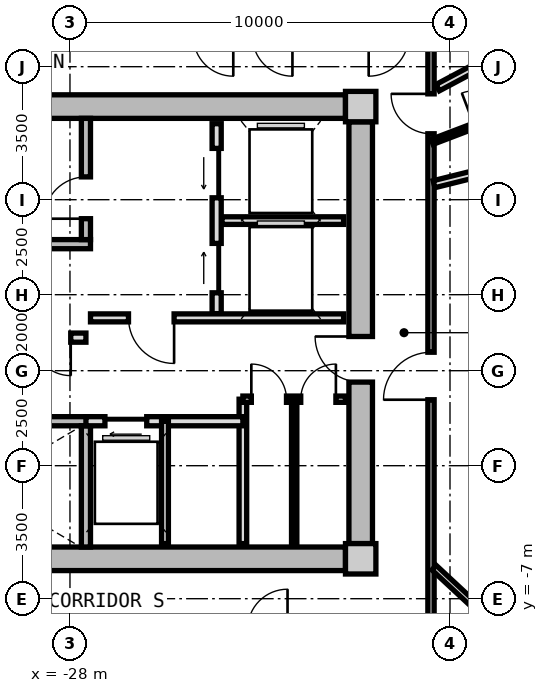
"""IFC4 building model, lengths in metres.
Left out: names, types, materials, properties, quantities, classifications, styles, units other than length and angle.
Written with IfcOpenShell. Run it as: python <this file> out.ifc"""

import sys

from ifc_helpers import new_model, si_unit, direction, frame, frame_2d, origin, origin_2d, place, context, subcontext, project, spatial, rectangle, extrude, source, transform, mapped, element, fill, save


model = new_model("IFC4")
c1 = context("Model", 3, precision=1e-05, world=origin(), true_north=direction((0.0, 1.0)))
c2 = subcontext(c1, "Body", "Model", "MODEL_VIEW")
j1 = project(units=[si_unit("LENGTHUNIT", "METRE"), si_unit("PLANEANGLEUNIT", "RADIAN")], contexts=[c1])
p1 = place(None, origin())
s1 = spatial("IfcSite", under=j1, at=p1, CompositionType="ELEMENT")
p2 = place(p1, origin())
s2 = spatial("IfcBuilding", under=s1, at=p2, CompositionType="ELEMENT")
p3 = place(p2, frame((0.0, 0.0, 146.5)))
s3 = spatial("IfcBuildingStorey", under=s2, at=p3, CompositionType="ELEMENT", Elevation=146.5)
m1 = source(origin(), c2, "Body", "SweptSolid", [
    extrude(rectangle(XDim=0.8, YDim=0.8, at=origin_2d()), origin(), (0.0, 0.0, 1.0), 3.05),
])
for number, where, z_axis, x_axis in (
    (1, (-20.35, -5.95, 0.0), (0.0, 0.0, 1.0), (1.0, 0.0, 0.0)),
    (2, (-20.35, 5.95, 0.0), (0.0, 0.0, 1.0), (1.0, 0.0, 0.0)),
):
    element("IfcColumn", number, at=place(p3, frame(where, z_axis=z_axis, x_axis=x_axis)), inside=s3, PredefinedType="COLUMN", context=c2, shape_type="MappedRepresentation", body=[
        mapped(m1, transform((0.0, 0.0, 0.0), x_axis=(1.0, 0.0, 0.0), y_axis=(0.0, 1.0, 0.0), z_axis=(0.0, 0.0, 1.0), scale=1.0)),
    ])
m2 = source(origin(), c2, "Body", "SweptSolid", [
    extrude(rectangle(XDim=14.5, YDim=0.62, at=frame_2d((7.25, 0.0))), origin(), (0.0, 0.0, 1.0), 2.81),
])
for number, where, z_axis, x_axis in (
    (3, (-35.25, 5.95, 0.0), (0.0, 0.0, 1.0), (1.0, 0.0, 0.0)),
    (4, (-20.75, -5.95, 0.0), (0.0, 0.0, 1.0), (-1.0, 0.0, 0.0)),
):
    element("IfcWall", number, at=place(p3, frame(where, z_axis=z_axis, x_axis=x_axis)), inside=s3, PredefinedType="SHEAR", context=c2, shape_type="MappedRepresentation", body=[
        mapped(m2, transform((0.0, 0.0, 0.0), x_axis=(1.0, 0.0, 0.0), y_axis=(0.0, 1.0, 0.0), z_axis=(0.0, 0.0, 1.0), scale=1.0)),
    ])
m3 = source(origin(), c2, "Body", "SweptSolid", [
    extrude(rectangle(XDim=11.1, YDim=0.62, at=frame_2d((5.55, 0.0))), origin(), (0.0, 0.0, 1.0), 2.81),
])
p4 = place(p3, frame((-20.35, 5.55, 0.0), z_axis=(0.0, 0.0, 1.0), x_axis=(0.0, -1.0, 0.0)))
e5 = element("IfcWall", 5, at=p4, inside=s3, PredefinedType="SHEAR", context=c2, shape_type="MappedRepresentation", body=[
    mapped(m3, transform((0.0, 0.0, 0.0), x_axis=(1.0, 0.0, 0.0), y_axis=(0.0, 1.0, 0.0), z_axis=(0.0, 0.0, 1.0), scale=1.0)),
])
p5 = place(p4, frame((5.65, 0.0, 0.0)))
e6 = element("IfcOpeningElement", 6, at=p5, cuts=e5, PredefinedType="OPENING", context=c2, shape_type="SweptSolid", body=[
    extrude(rectangle(XDim=1.2, YDim=2.15, at=frame_2d((0.6, 1.075))), frame((0.0, 0.32, 0.0), z_axis=(0.0, -1.0, 0.0), x_axis=(1.0, 0.0, 0.0)), (0.0, 0.0, 1.0), 0.64),
])
m4 = source(origin(), c2, "Body", "SweptSolid", [
    extrude(rectangle(XDim=7.88, YDim=0.24, at=frame_2d((3.94, 0.0))), origin(), (0.0, 0.0, 1.0), 2.81),
])
p6 = place(p3, frame((-35.34, 2.33, 0.0), z_axis=(0.0, 0.0, 1.0), x_axis=(1.0, 0.0, 0.0)))
e7 = element("IfcWall", 7, at=p6, inside=s3, PredefinedType="PARTITIONING", context=c2, shape_type="MappedRepresentation", body=[
    mapped(m4, transform((0.0, 0.0, 0.0), x_axis=(1.0, 0.0, 0.0), y_axis=(0.0, 1.0, 0.0), z_axis=(0.0, 0.0, 1.0), scale=1.0)),
])
m5 = source(origin(), c2, "Body", "SweptSolid", [
    extrude(rectangle(XDim=3.19, YDim=0.24, at=frame_2d((1.595, 0.0))), origin(), (0.0, 0.0, 1.0), 2.81),
])
p7 = place(p3, frame((-27.58, 2.45, 0.0), z_axis=(0.0, 0.0, 1.0), x_axis=(0.0, 1.0, 0.0)))
e8 = element("IfcWall", 8, at=p7, inside=s3, PredefinedType="PARTITIONING", context=c2, shape_type="MappedRepresentation", body=[
    mapped(m5, transform((0.0, 0.0, 0.0), x_axis=(1.0, 0.0, 0.0), y_axis=(0.0, 1.0, 0.0), z_axis=(0.0, 0.0, 1.0), scale=1.0)),
])
p8 = place(p7, frame((0.55, 0.0, 0.0)))
e9 = element("IfcOpeningElement", 9, at=p8, cuts=e8, PredefinedType="OPENING", context=c2, shape_type="SweptSolid", body=[
    extrude(rectangle(XDim=1.1, YDim=2.15, at=frame_2d((0.55, 1.075))), frame((0.0, 0.13, 0.0), z_axis=(0.0, -1.0, 0.0), x_axis=(1.0, 0.0, 0.0)), (0.0, 0.0, 1.0), 0.26),
])
p9 = place(p3, frame((-35.34, -2.33, 0.0), z_axis=(0.0, 0.0, 1.0), x_axis=(1.0, 0.0, 0.0)))
e10 = element("IfcWall", 10, at=p9, inside=s3, PredefinedType="PARTITIONING", context=c2, shape_type="MappedRepresentation", body=[
    mapped(m4, transform((0.0, 0.0, 0.0), x_axis=(1.0, 0.0, 0.0), y_axis=(0.0, 1.0, 0.0), z_axis=(0.0, 0.0, 1.0), scale=1.0)),
])
p10 = place(p9, frame((1.0, 0.0, 0.0)))
e11 = element("IfcOpeningElement", 11, at=p10, cuts=e10, PredefinedType="OPENING", context=c2, shape_type="SweptSolid", body=[
    extrude(rectangle(XDim=1.1, YDim=2.15, at=frame_2d((0.55, 1.075))), frame((0.0, 0.13, 0.0), z_axis=(0.0, -1.0, 0.0), x_axis=(1.0, 0.0, 0.0)), (0.0, 0.0, 1.0), 0.26),
])
p11 = place(p3, frame((-27.58, -5.64, 0.0), z_axis=(0.0, 0.0, 1.0), x_axis=(0.0, 1.0, 0.0)))
e12 = element("IfcWall", 12, at=p11, inside=s3, PredefinedType="PARTITIONING", context=c2, shape_type="MappedRepresentation", body=[
    mapped(m5, transform((0.0, 0.0, 0.0), x_axis=(1.0, 0.0, 0.0), y_axis=(0.0, 1.0, 0.0), z_axis=(0.0, 0.0, 1.0), scale=1.0)),
])
m6 = source(origin(), c2, "Body", "SweptSolid", [
    extrude(rectangle(XDim=5.0, YDim=0.24, at=frame_2d((2.5, 0.0))), origin(), (0.0, 0.0, 1.0), 2.795),
])
p12 = place(p3, frame((-24.14, 0.5, 0.0), z_axis=(0.0, 0.0, 1.0), x_axis=(0.0, 1.0, 0.0)))
e13 = element("IfcWall", 13, at=p12, inside=s3, PredefinedType="PARTITIONING", context=c2, shape_type="MappedRepresentation", body=[
    mapped(m6, transform((0.0, 0.0, 0.0), x_axis=(1.0, 0.0, 0.0), y_axis=(0.0, 1.0, 0.0), z_axis=(0.0, 0.0, 1.0), scale=1.0)),
])
p13 = place(p12, frame((3.05, 0.0, 0.0)))
e14 = element("IfcOpeningElement", 14, at=p13, cuts=e13, PredefinedType="OPENING", context=c2, shape_type="SweptSolid", body=[
    extrude(rectangle(XDim=1.3, YDim=2.2, at=frame_2d((0.65, 1.1))), frame((0.0, 0.13, 0.0), z_axis=(0.0, -1.0, 0.0), x_axis=(1.0, 0.0, 0.0)), (0.0, 0.0, 1.0), 0.26),
])
p14 = place(p12, frame((0.55, 0.0, 0.0)))
e15 = element("IfcOpeningElement", 15, at=p14, cuts=e13, PredefinedType="OPENING", context=c2, shape_type="SweptSolid", body=[
    extrude(rectangle(XDim=1.3, YDim=2.2, at=frame_2d((0.65, 1.1))), frame((0.0, 0.13, 0.0), z_axis=(0.0, -1.0, 0.0), x_axis=(1.0, 0.0, 0.0)), (0.0, 0.0, 1.0), 0.26),
])
m7 = source(origin(), c2, "Body", "SweptSolid", [
    extrude(rectangle(XDim=3.2, YDim=0.2, at=frame_2d((1.6, 0.0))), origin(), (0.0, 0.0, 1.0), 2.795),
])
p15 = place(p3, frame((-24.0, 2.95, 0.0), z_axis=(0.0, 0.0, 1.0), x_axis=(1.0, 0.0, 0.0)))
e16 = element("IfcWall", 16, at=p15, inside=s3, PredefinedType="PARTITIONING", context=c2, shape_type="MappedRepresentation", body=[
    mapped(m7, transform((0.0, 0.0, 0.0), x_axis=(1.0, 0.0, 0.0), y_axis=(0.0, 1.0, 0.0), z_axis=(0.0, 0.0, 1.0), scale=1.0)),
])
m8 = source(origin(), c2, "Body", "SweptSolid", [
    extrude(rectangle(XDim=6.66, YDim=0.21, at=frame_2d((3.33, 0.0))), origin(), (0.0, 0.0, 1.0), 2.795),
])
p16 = place(p3, frame((-27.46, 0.39, 0.0), z_axis=(0.0, 0.0, 1.0), x_axis=(1.0, 0.0, 0.0)))
e17 = element("IfcWall", 17, at=p16, inside=s3, PredefinedType="PARTITIONING", context=c2, shape_type="MappedRepresentation", body=[
    mapped(m8, transform((0.0, 0.0, 0.0), x_axis=(1.0, 0.0, 0.0), y_axis=(0.0, 1.0, 0.0), z_axis=(0.0, 0.0, 1.0), scale=1.0)),
])
p17 = place(p16, frame((1.0, 0.0, 0.0)))
e18 = element("IfcOpeningElement", 18, at=p17, cuts=e17, PredefinedType="OPENING", context=c2, shape_type="SweptSolid", body=[
    extrude(rectangle(XDim=1.2, YDim=2.15, at=frame_2d((0.6, 1.075))), frame((0.0, 0.115, 0.0), z_axis=(0.0, -1.0, 0.0), x_axis=(1.0, 0.0, 0.0)), (0.0, 0.0, 1.0), 0.23),
])
m9 = source(origin(), c2, "Body", "SweptSolid", [
    extrude(rectangle(XDim=7.62, YDim=0.24, at=frame_2d((3.81, 0.0))), origin(), (0.0, 0.0, 1.0), 2.795),
])
p18 = place(p3, frame((-35.2, -0.13, 0.0), z_axis=(0.0, 0.0, 1.0), x_axis=(1.0, 0.0, 0.0)))
e19 = element("IfcWall", 19, at=p18, inside=s3, PredefinedType="PARTITIONING", context=c2, shape_type="MappedRepresentation", body=[
    mapped(m9, transform((0.0, 0.0, 0.0), x_axis=(1.0, 0.0, 0.0), y_axis=(0.0, 1.0, 0.0), z_axis=(0.0, 0.0, 1.0), scale=1.0)),
])
p19 = place(p18, frame((6.22, 0.0, 0.0)))
e20 = element("IfcOpeningElement", 20, at=p19, cuts=e19, PredefinedType="OPENING", context=c2, shape_type="SweptSolid", body=[
    extrude(rectangle(XDim=1.0, YDim=2.1, at=frame_2d((0.5, 1.05))), frame((0.0, 0.13, 0.0), z_axis=(0.0, -1.0, 0.0), x_axis=(1.0, 0.0, 0.0)), (0.0, 0.0, 1.0), 0.26),
])
p20 = place(p18, frame((2.4, 0.0, 0.0)))
e21 = element("IfcOpeningElement", 21, at=p20, cuts=e19, PredefinedType="OPENING", context=c2, shape_type="SweptSolid", body=[
    extrude(rectangle(XDim=1.0, YDim=2.1, at=frame_2d((0.5, 1.05))), frame((0.0, 0.13, 0.0), z_axis=(0.0, -1.0, 0.0), x_axis=(1.0, 0.0, 0.0)), (0.0, 0.0, 1.0), 0.26),
])
m10 = source(origin(), c2, "Body", "SweptSolid", [
    extrude(rectangle(XDim=3.8, YDim=0.2, at=frame_2d((1.9, 0.0))), origin(), (0.0, 0.0, 1.0), 2.795),
])
p21 = place(p3, frame((-23.45, -5.55, 0.0), z_axis=(0.0, 0.0, 1.0), x_axis=(0.0, 1.0, 0.0)))
e22 = element("IfcWall", 22, at=p21, inside=s3, PredefinedType="PARTITIONING", context=c2, shape_type="MappedRepresentation", body=[
    mapped(m10, transform((0.0, 0.0, 0.0), x_axis=(1.0, 0.0, 0.0), y_axis=(0.0, 1.0, 0.0), z_axis=(0.0, 0.0, 1.0), scale=1.0)),
])
m11 = source(origin(), c2, "Body", "SweptSolid", [
    extrude(rectangle(XDim=4.13, YDim=0.24, at=frame_2d((2.065, 0.0))), origin(), (0.0, 0.0, 1.0), 2.795),
])
p22 = place(p3, frame((-27.58, -2.33, 0.0), z_axis=(0.0, 0.0, 1.0), x_axis=(1.0, 0.0, 0.0)))
e23 = element("IfcWall", 23, at=p22, inside=s3, PredefinedType="PARTITIONING", context=c2, shape_type="MappedRepresentation", body=[
    mapped(m11, transform((0.0, 0.0, 0.0), x_axis=(1.0, 0.0, 0.0), y_axis=(0.0, 1.0, 0.0), z_axis=(0.0, 0.0, 1.0), scale=1.0)),
])
p23 = place(p22, frame((0.5, 0.0, 0.0)))
e24 = element("IfcOpeningElement", 24, at=p23, cuts=e23, PredefinedType="OPENING", context=c2, shape_type="SweptSolid", body=[
    extrude(rectangle(XDim=1.1, YDim=2.2, at=frame_2d((0.55, 1.1))), frame((0.0, 0.13, 0.0), z_axis=(0.0, -1.0, 0.0), x_axis=(1.0, 0.0, 0.0)), (0.0, 0.0, 1.0), 0.26),
])
m12 = source(origin(), c2, "Body", "SweptSolid", [
    extrude(rectangle(XDim=3.22, YDim=0.18, at=frame_2d((1.61, 0.0))), origin(), (0.0, 0.0, 1.0), 2.795),
])
p24 = place(p3, frame((-25.5, -5.55, 0.0), z_axis=(0.0, 0.0, 1.0), x_axis=(0.0, 1.0, 0.0)))
e25 = element("IfcWall", 25, at=p24, inside=s3, PredefinedType="PARTITIONING", context=c2, shape_type="MappedRepresentation", body=[
    mapped(m12, transform((0.0, 0.0, 0.0), x_axis=(1.0, 0.0, 0.0), y_axis=(0.0, 1.0, 0.0), z_axis=(0.0, 0.0, 1.0), scale=1.0)),
])
m13 = source(origin(), c2, "Body", "SweptSolid", [
    extrude(rectangle(XDim=2.7, YDim=0.165, at=frame_2d((1.35, 0.0))), origin(), (0.0, 0.0, 1.0), 2.795),
])
p25 = place(p3, frame((-23.45, -1.75, 0.0), z_axis=(0.0, 0.0, 1.0), x_axis=(1.0, 0.0, 0.0)))
e26 = element("IfcWall", 26, at=p25, inside=s3, PredefinedType="PARTITIONING", context=c2, shape_type="MappedRepresentation", body=[
    mapped(m13, transform((0.0, 0.0, 0.0), x_axis=(1.0, 0.0, 0.0), y_axis=(0.0, 1.0, 0.0), z_axis=(0.0, 0.0, 1.0), scale=1.0)),
])
p26 = place(p25, frame((0.222, 0.0, 0.0)))
e27 = element("IfcOpeningElement", 27, at=p26, cuts=e26, PredefinedType="OPENING", context=c2, shape_type="SweptSolid", body=[
    extrude(rectangle(XDim=0.925, YDim=2.1, at=frame_2d((0.462, 1.05))), frame((0.0, 0.093, 0.0), z_axis=(0.0, -1.0, 0.0), x_axis=(1.0, 0.0, 0.0)), (0.0, 0.0, 1.0), 0.185),
])
p27 = place(p25, frame((1.522, 0.0, 0.0)))
e28 = element("IfcOpeningElement", 28, at=p27, cuts=e26, PredefinedType="OPENING", context=c2, shape_type="SweptSolid", body=[
    extrude(rectangle(XDim=0.925, YDim=2.1, at=frame_2d((0.462, 1.05))), frame((0.0, 0.093, 0.0), z_axis=(0.0, -1.0, 0.0), x_axis=(1.0, 0.0, 0.0)), (0.0, 0.0, 1.0), 0.185),
])
m14 = source(origin(), c2, "Body", "SweptSolid", [
    extrude(rectangle(XDim=3.8, YDim=0.14, at=frame_2d((1.9, 0.0))), origin(), (0.0, 0.0, 1.0), 2.795),
])
p28 = place(p3, frame((-22.1, -5.55, 0.0), z_axis=(0.0, 0.0, 1.0), x_axis=(0.0, 1.0, 0.0)))
e29 = element("IfcWall", 29, at=p28, inside=s3, PredefinedType="PARTITIONING", context=c2, shape_type="MappedRepresentation", body=[
    mapped(m14, transform((0.0, 0.0, 0.0), x_axis=(1.0, 0.0, 0.0), y_axis=(0.0, 1.0, 0.0), z_axis=(0.0, 0.0, 1.0), scale=1.0)),
])
m15 = source(origin(), c2, "Body", "SweptSolid", [
    extrude(rectangle(XDim=15.6, YDim=0.165, at=frame_2d((7.8, 0.0))), origin(), (0.0, 0.0, 1.0), 2.795),
])
p29 = place(p3, frame((-18.5, 7.8, 0.0), z_axis=(0.0, 0.0, 1.0), x_axis=(0.0, -1.0, 0.0)))
e30 = element("IfcWall", 30, at=p29, inside=s3, PredefinedType="PARTITIONING", context=c2, shape_type="MappedRepresentation", body=[
    mapped(m15, transform((0.0, 0.0, 0.0), x_axis=(1.0, 0.0, 0.0), y_axis=(0.0, 1.0, 0.0), z_axis=(0.0, 0.0, 1.0), scale=1.0)),
])
p30 = place(p29, frame((8.314, 0.0, 0.0)))
e31 = element("IfcOpeningElement", 31, at=p30, cuts=e30, PredefinedType="OPENING", context=c2, shape_type="SweptSolid", body=[
    extrude(rectangle(XDim=1.25, YDim=2.2, at=frame_2d((0.625, 1.1))), frame((0.0, 0.093, 0.0), z_axis=(0.0, -1.0, 0.0), x_axis=(1.0, 0.0, 0.0)), (0.0, 0.0, 1.0), 0.185),
])
p31 = place(p29, frame((1.515, 0.0, 0.0)))
e32 = element("IfcOpeningElement", 32, at=p31, cuts=e30, PredefinedType="OPENING", context=c2, shape_type="SweptSolid", body=[
    extrude(rectangle(XDim=1.05, YDim=2.15, at=frame_2d((0.525, 1.075))), frame((0.0, 0.093, 0.0), z_axis=(0.0, -1.0, 0.0), x_axis=(1.0, 0.0, 0.0)), (0.0, 0.0, 1.0), 0.185),
])
m16 = source(origin(), c2, "Body", "SweptSolid", [
    extrude(rectangle(XDim=4.927, YDim=0.165, at=frame_2d((2.463, 0.0))), origin(), (0.0, 0.0, 1.0), 2.345),
])
p32 = place(p3, frame((-18.42, -6.183, 0.0), z_axis=(0.0, 0.0, 1.0), x_axis=(0.732191335987, -0.681098999783, 0.0)))
e33 = element("IfcWall", 33, at=p32, inside=s3, PredefinedType="PARTITIONING", context=c2, shape_type="MappedRepresentation", body=[
    mapped(m16, transform((0.0, 0.0, 0.0), x_axis=(1.0, 0.0, 0.0), y_axis=(0.0, 1.0, 0.0), z_axis=(0.0, 0.0, 1.0), scale=1.0)),
])
m17 = source(origin(), c2, "Body", "SweptSolid", [
    extrude(rectangle(XDim=8.305, YDim=0.19, at=frame_2d((4.153, 0.0))), origin(), (0.0, 0.0, 1.0), 2.345),
])
p33 = place(p3, frame((-18.42, 3.908, 0.0), z_axis=(0.0, 0.0, 1.0), x_axis=(0.970309994378, 0.241864662175, 0.0)))
e34 = element("IfcWall", 34, at=p33, inside=s3, PredefinedType="PARTITIONING", context=c2, shape_type="MappedRepresentation", body=[
    mapped(m17, transform((0.0, 0.0, 0.0), x_axis=(1.0, 0.0, 0.0), y_axis=(0.0, 1.0, 0.0), z_axis=(0.0, 0.0, 1.0), scale=1.0)),
])
m18 = source(origin(), c2, "Body", "SweptSolid", [
    extrude(rectangle(XDim=6.499, YDim=0.19, at=frame_2d((3.25, 0.0))), origin(), (0.0, 0.0, 1.0), 2.795),
])
p34 = place(p3, frame((-18.324, 6.449, 0.0), z_axis=(0.0, 0.0, 1.0), x_axis=(0.882715595921, 0.469907625729, 0.0)))
e35 = element("IfcWall", 35, at=p34, inside=s3, PredefinedType="PARTITIONING", context=c2, shape_type="MappedRepresentation", body=[
    mapped(m18, transform((0.0, 0.0, 0.0), x_axis=(1.0, 0.0, 0.0), y_axis=(0.0, 1.0, 0.0), z_axis=(0.0, 0.0, 1.0), scale=1.0)),
])
m19 = source(origin(), c2, "Body", "SweptSolid", [
    extrude(rectangle(XDim=3.295, YDim=0.14, at=frame_2d((1.647, 0.0))), origin(), (0.0, 0.0, 1.0), 2.795),
])
p35 = place(p3, frame((-18.47, 5.023, 0.0), z_axis=(0.0, 0.0, 1.0), x_axis=(0.934202224769, 0.356743890258, 0.0)))
e36 = element("IfcWall", 36, at=p35, inside=s3, PredefinedType="PARTITIONING", context=c2, shape_type="MappedRepresentation", body=[
    mapped(m19, transform((0.0, 0.0, 0.0), x_axis=(1.0, 0.0, 0.0), y_axis=(0.0, 1.0, 0.0), z_axis=(0.0, 0.0, 1.0), scale=1.0)),
])
p36 = place(p35, frame((1.188, 0.0, 0.0)))
e37 = element("IfcOpeningElement", 37, at=p36, cuts=e36, PredefinedType="OPENING", context=c2, shape_type="SweptSolid", body=[
    extrude(rectangle(XDim=0.92, YDim=2.1, at=frame_2d((0.46, 1.05))), frame((0.0, 0.08, 0.0), z_axis=(0.0, -1.0, 0.0), x_axis=(1.0, 0.0, 0.0)), (0.0, 0.0, 1.0), 0.16),
])
m20 = source(origin(), c2, "Body", "SweptSolid", [
    extrude(rectangle(XDim=1.1, YDim=2.15, at=frame_2d((0.55, 1.075))), frame((0.0, 0.025, 0.0), z_axis=(0.0, -1.0, 0.0), x_axis=(1.0, 0.0, 0.0)), (0.0, 0.0, 1.0), 0.05),
])
p37 = place(p8, origin())
e38 = element("IfcDoor", 38, at=p37, inside=s3, OperationType="SINGLE_SWING_LEFT", PredefinedType="DOOR", context=c2, shape_type="MappedRepresentation", body=[
    mapped(m20, transform((0.0, 0.0, 0.0), x_axis=(1.0, 0.0, 0.0), y_axis=(0.0, 1.0, 0.0), z_axis=(0.0, 0.0, 1.0), scale=1.0)),
])
fill(e9, e38)
m21 = source(origin(), c2, "Body", "SweptSolid", [
    extrude(rectangle(XDim=1.3, YDim=2.2, at=frame_2d((0.65, 1.1))), frame((0.0, 0.025, 0.0), z_axis=(0.0, -1.0, 0.0), x_axis=(1.0, 0.0, 0.0)), (0.0, 0.0, 1.0), 0.05),
])
p38 = place(p13, origin())
e39 = element("IfcDoor", 39, at=p38, inside=s3, OperationType="SLIDING_TO_LEFT", PredefinedType="DOOR", context=c2, shape_type="MappedRepresentation", body=[
    mapped(m21, transform((0.0, 0.0, 0.0), x_axis=(1.0, 0.0, 0.0), y_axis=(0.0, 1.0, 0.0), z_axis=(0.0, 0.0, 1.0), scale=1.0)),
])
fill(e14, e39)
p39 = place(p14, origin())
e40 = element("IfcDoor", 40, at=p39, inside=s3, OperationType="SLIDING_TO_RIGHT", PredefinedType="DOOR", context=c2, shape_type="MappedRepresentation", body=[
    mapped(m21, transform((0.0, 0.0, 0.0), x_axis=(1.0, 0.0, 0.0), y_axis=(0.0, 1.0, 0.0), z_axis=(0.0, 0.0, 1.0), scale=1.0)),
])
fill(e15, e40)
m22 = source(origin(), c2, "Body", "SweptSolid", [
    extrude(rectangle(XDim=1.2, YDim=2.15, at=frame_2d((0.6, 1.075))), frame((0.0, 0.025, 0.0), z_axis=(0.0, -1.0, 0.0), x_axis=(1.0, 0.0, 0.0)), (0.0, 0.0, 1.0), 0.05),
])
p40 = place(p17, frame((1.2, 0.0, 0.0), z_axis=(0.0, 0.0, 1.0), x_axis=(-1.0, 0.0, 0.0)))
e41 = element("IfcDoor", 41, at=p40, inside=s3, OperationType="SINGLE_SWING_LEFT", PredefinedType="DOOR", context=c2, shape_type="MappedRepresentation", body=[
    mapped(m22, transform((0.0, 0.0, 0.0), x_axis=(1.0, 0.0, 0.0), y_axis=(0.0, 1.0, 0.0), z_axis=(0.0, 0.0, 1.0), scale=1.0)),
])
fill(e18, e41)
p41 = place(p5, frame((1.2, 0.0, 0.0), z_axis=(0.0, 0.0, 1.0), x_axis=(-1.0, 0.0, 0.0)))
e42 = element("IfcDoor", 42, at=p41, inside=s3, OperationType="SINGLE_SWING_RIGHT", PredefinedType="DOOR", context=c2, shape_type="MappedRepresentation", body=[
    mapped(m22, transform((0.0, 0.0, 0.0), x_axis=(1.0, 0.0, 0.0), y_axis=(0.0, 1.0, 0.0), z_axis=(0.0, 0.0, 1.0), scale=1.0)),
])
fill(e6, e42)
m23 = source(origin(), c2, "Body", "SweptSolid", [
    extrude(rectangle(XDim=1.0, YDim=2.1, at=frame_2d((0.5, 1.05))), frame((0.0, 0.025, 0.0), z_axis=(0.0, -1.0, 0.0), x_axis=(1.0, 0.0, 0.0)), (0.0, 0.0, 1.0), 0.05),
])
p42 = place(p19, frame((1.0, 0.0, 0.0), z_axis=(0.0, 0.0, 1.0), x_axis=(-1.0, 0.0, 0.0)))
e43 = element("IfcDoor", 43, at=p42, inside=s3, OperationType="SINGLE_SWING_LEFT", PredefinedType="DOOR", context=c2, shape_type="MappedRepresentation", body=[
    mapped(m23, transform((0.0, 0.0, 0.0), x_axis=(1.0, 0.0, 0.0), y_axis=(0.0, 1.0, 0.0), z_axis=(0.0, 0.0, 1.0), scale=1.0)),
])
fill(e20, e43)
m24 = source(origin(), c2, "Body", "SweptSolid", [
    extrude(rectangle(XDim=1.1, YDim=2.2, at=frame_2d((0.55, 1.1))), frame((0.0, 0.025, 0.0), z_axis=(0.0, -1.0, 0.0), x_axis=(1.0, 0.0, 0.0)), (0.0, 0.0, 1.0), 0.05),
])
p43 = place(p23, frame((1.1, 0.0, 0.0), z_axis=(0.0, 0.0, 1.0), x_axis=(-1.0, 0.0, 0.0)))
e44 = element("IfcDoor", 44, at=p43, inside=s3, OperationType="SLIDING_TO_LEFT", PredefinedType="DOOR", context=c2, shape_type="MappedRepresentation", body=[
    mapped(m24, transform((0.0, 0.0, 0.0), x_axis=(1.0, 0.0, 0.0), y_axis=(0.0, 1.0, 0.0), z_axis=(0.0, 0.0, 1.0), scale=1.0)),
])
fill(e24, e44)
m25 = source(origin(), c2, "Body", "SweptSolid", [
    extrude(rectangle(XDim=0.925, YDim=2.1, at=frame_2d((0.462, 1.05))), frame((0.0, 0.025, 0.0), z_axis=(0.0, -1.0, 0.0), x_axis=(1.0, 0.0, 0.0)), (0.0, 0.0, 1.0), 0.05),
])
p44 = place(p26, origin())
e45 = element("IfcDoor", 45, at=p44, inside=s3, OperationType="SINGLE_SWING_LEFT", PredefinedType="DOOR", context=c2, shape_type="MappedRepresentation", body=[
    mapped(m25, transform((0.0, 0.0, 0.0), x_axis=(1.0, 0.0, 0.0), y_axis=(0.0, 1.0, 0.0), z_axis=(0.0, 0.0, 1.0), scale=1.0)),
])
fill(e27, e45)
p45 = place(p27, origin())
e46 = element("IfcDoor", 46, at=p45, inside=s3, OperationType="SINGLE_SWING_RIGHT", PredefinedType="DOOR", context=c2, shape_type="MappedRepresentation", body=[
    mapped(m25, transform((0.0, 0.0, 0.0), x_axis=(1.0, 0.0, 0.0), y_axis=(0.0, 1.0, 0.0), z_axis=(0.0, 0.0, 1.0), scale=1.0)),
])
fill(e28, e46)
m26 = source(origin(), c2, "Body", "SweptSolid", [
    extrude(rectangle(XDim=1.25, YDim=2.2, at=frame_2d((0.625, 1.1))), frame((0.0, 0.025, 0.0), z_axis=(0.0, -1.0, 0.0), x_axis=(1.0, 0.0, 0.0)), (0.0, 0.0, 1.0), 0.05),
])
p46 = place(p30, frame((1.25, 0.0, 0.0), z_axis=(0.0, 0.0, 1.0), x_axis=(-1.0, 0.0, 0.0)))
e47 = element("IfcDoor", 47, at=p46, inside=s3, OperationType="SINGLE_SWING_LEFT", PredefinedType="DOOR", context=c2, shape_type="MappedRepresentation", body=[
    mapped(m26, transform((0.0, 0.0, 0.0), x_axis=(1.0, 0.0, 0.0), y_axis=(0.0, 1.0, 0.0), z_axis=(0.0, 0.0, 1.0), scale=1.0)),
])
fill(e31, e47)
m27 = source(origin(), c2, "Body", "SweptSolid", [
    extrude(rectangle(XDim=1.05, YDim=2.15, at=frame_2d((0.525, 1.075))), frame((0.0, 0.025, 0.0), z_axis=(0.0, -1.0, 0.0), x_axis=(1.0, 0.0, 0.0)), (0.0, 0.0, 1.0), 0.05),
])
p47 = place(p31, frame((1.05, 0.0, 0.0), z_axis=(0.0, 0.0, 1.0), x_axis=(-1.0, 0.0, 0.0)))
e48 = element("IfcDoor", 48, at=p47, inside=s3, OperationType="SINGLE_SWING_RIGHT", PredefinedType="DOOR", context=c2, shape_type="MappedRepresentation", body=[
    mapped(m27, transform((0.0, 0.0, 0.0), x_axis=(1.0, 0.0, 0.0), y_axis=(0.0, 1.0, 0.0), z_axis=(0.0, 0.0, 1.0), scale=1.0)),
])
fill(e32, e48)
save(model, sys.argv[1])
